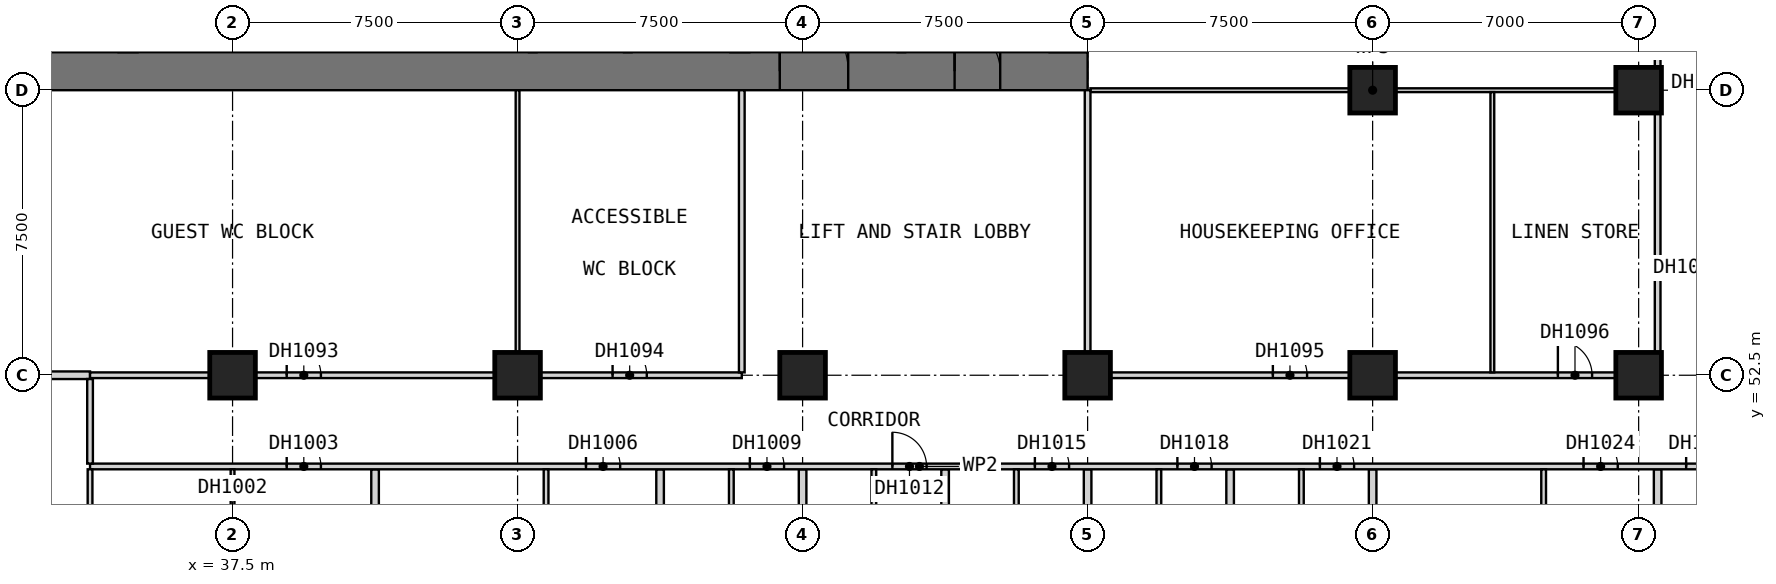
"""IFC4 building model, lengths in metres.
Left out: names, types, materials, properties, quantities, classifications, styles, units other than length and angle.
Written with IfcOpenShell. Run it as: python <this file> out.ifc"""

import sys

from ifc_helpers import new_model, si_unit, direction, frame, frame_2d, origin, origin_2d, place, context, subcontext, project, spatial, rectangle, extrude, element, fill, save


model = new_model("IFC4")
c1 = context("Model", 3, precision=1e-05, world=origin(), true_north=direction((0.0, 1.0)))
c2 = subcontext(c1, "Body", "Model", "MODEL_VIEW")
j1 = project(units=[si_unit("LENGTHUNIT", "METRE"), si_unit("PLANEANGLEUNIT", "RADIAN")], contexts=[c1])
p1 = place(None, origin())
s1 = spatial("IfcSite", under=j1, at=p1, CompositionType="ELEMENT")
p2 = place(p1, origin())
s2 = spatial("IfcBuilding", under=s1, at=p2, CompositionType="ELEMENT")
p3 = place(p2, frame((0.0, 0.0, 34.0)))
s3 = spatial("IfcBuildingStorey", under=s2, at=p3, CompositionType="ELEMENT", Elevation=34.0)
for number, where, z_axis, x_axis in (
    (1, (37.5, 52.5, 0.0), (0.0, 0.0, 1.0), (1.0, 0.0, 0.0)),
    (2, (45.0, 52.5, 0.0), (0.0, 0.0, 1.0), (1.0, 0.0, 0.0)),
    (3, (52.5, 52.5, 0.0), (0.0, 0.0, 1.0), (1.0, 0.0, 0.0)),
    (4, (60.0, 52.5, 0.0), (0.0, 0.0, 1.0), (1.0, 0.0, 0.0)),
    (5, (67.5, 52.5, 0.0), (0.0, 0.0, 1.0), (1.0, 0.0, 0.0)),
    (6, (67.5, 60.0, 0.0), (0.0, 0.0, 1.0), (1.0, 0.0, 0.0)),
    (7, (74.5, 52.5, 0.0), (0.0, 0.0, 1.0), (1.0, 0.0, 0.0)),
    (8, (74.5, 60.0, 0.0), (0.0, 0.0, 1.0), (1.0, 0.0, 0.0)),
):
    element("IfcColumn", number, at=place(p3, frame(where, z_axis=z_axis, x_axis=x_axis)), inside=s3, PredefinedType="COLUMN", context=c2, shape_type="SweptSolid", body=[
        extrude(rectangle(XDim=1.2, YDim=1.2, at=origin_2d()), origin(), (0.0, 0.0, 1.0), 3.6),
    ])
p4 = place(p3, frame((30.0, 60.5, 0.0), z_axis=(0.0, 0.0, 1.0), x_axis=(1.0, 0.0, 0.0)))
e9 = element("IfcWall", 9, at=p4, inside=s3, PredefinedType="SHEAR", context=c2, shape_type="SweptSolid", body=[
    extrude(rectangle(XDim=30.0, YDim=1.0, at=frame_2d((15.0, 0.0))), origin(), (0.0, 0.0, 1.0), 3.6),
])
p5 = place(p4, frame((21.9, 0.0, 0.0)))
e10 = element("IfcOpeningElement", 10, at=p5, cuts=e9, PredefinedType="OPENING", context=c2, shape_type="SweptSolid", body=[
    extrude(rectangle(XDim=1.8, YDim=2.1, at=frame_2d((0.9, 1.05))), frame((0.0, 0.51, 0.0), z_axis=(0.0, -1.0, 0.0), x_axis=(1.0, 0.0, 0.0)), (0.0, 0.0, 1.0), 1.02),
])
p6 = place(p4, frame((26.5, 0.0, 0.0)))
e11 = element("IfcOpeningElement", 11, at=p6, cuts=e9, PredefinedType="OPENING", context=c2, shape_type="SweptSolid", body=[
    extrude(rectangle(XDim=1.2, YDim=2.1, at=frame_2d((0.6, 1.05))), frame((0.0, 0.51, 0.0), z_axis=(0.0, -1.0, 0.0), x_axis=(1.0, 0.0, 0.0)), (0.0, 0.0, 1.0), 1.02),
])
p7 = place(p3, frame((30.0, 52.5, 0.0), z_axis=(0.0, 0.0, 1.0), x_axis=(1.0, 0.0, 0.0)))
e12 = element("IfcWall", 12, at=p7, inside=s3, PredefinedType="PARTITIONING", context=c2, shape_type="SweptSolid", body=[
    extrude(rectangle(XDim=3.75, YDim=0.2, at=frame_2d((1.875, 0.0))), origin(), (0.0, 0.0, 1.0), 3.35),
])
for number, where, z_axis, x_axis in (
    (13, (41.25, 38.31, 0.0), (0.0, 0.0, 1.0), (0.0, 1.0, 0.0)),
    (14, (48.75, 38.31, 0.0), (0.0, 0.0, 1.0), (0.0, 1.0, 0.0)),
):
    element("IfcWall", number, at=place(p3, frame(where, z_axis=z_axis, x_axis=x_axis)), inside=s3, PredefinedType="PARTITIONING", context=c2, shape_type="SweptSolid", body=[
        extrude(rectangle(XDim=11.715, YDim=0.2, at=frame_2d((5.857, 0.0))), origin(), (0.0, 0.0, 1.0), 3.35),
    ])
p8 = place(p3, frame((52.5, 37.5, 0.0), z_axis=(0.0, 0.0, 1.0), x_axis=(0.0, 1.0, 0.0)))
e15 = element("IfcWall", 15, at=p8, inside=s3, PredefinedType="PARTITIONING", context=c2, shape_type="SweptSolid", body=[
    extrude(rectangle(XDim=12.525, YDim=0.2, at=frame_2d((6.262, 0.0))), origin(), (0.0, 0.0, 1.0), 3.35),
])
p9 = place(p3, frame((56.25, 38.31, 0.0), z_axis=(0.0, 0.0, 1.0), x_axis=(0.0, 1.0, 0.0)))
e16 = element("IfcWall", 16, at=p9, inside=s3, PredefinedType="PARTITIONING", context=c2, shape_type="SweptSolid", body=[
    extrude(rectangle(XDim=11.715, YDim=0.2, at=frame_2d((5.857, 0.0))), origin(), (0.0, 0.0, 1.0), 3.35),
])
p10 = place(p3, frame((60.0, 37.5, 0.0), z_axis=(0.0, 0.0, 1.0), x_axis=(0.0, 1.0, 0.0)))
e17 = element("IfcWall", 17, at=p10, inside=s3, PredefinedType="PARTITIONING", context=c2, shape_type="SweptSolid", body=[
    extrude(rectangle(XDim=12.525, YDim=0.2, at=frame_2d((6.262, 0.0))), origin(), (0.0, 0.0, 1.0), 3.35),
])
p11 = place(p3, frame((63.75, 38.31, 0.0), z_axis=(0.0, 0.0, 1.0), x_axis=(0.0, 1.0, 0.0)))
e18 = element("IfcWall", 18, at=p11, inside=s3, PredefinedType="PARTITIONING", context=c2, shape_type="SweptSolid", body=[
    extrude(rectangle(XDim=11.715, YDim=0.2, at=frame_2d((5.857, 0.0))), origin(), (0.0, 0.0, 1.0), 3.35),
])
p12 = place(p3, frame((67.5, 37.5, 0.0), z_axis=(0.0, 0.0, 1.0), x_axis=(0.0, 1.0, 0.0)))
e19 = element("IfcWall", 19, at=p12, inside=s3, PredefinedType="PARTITIONING", context=c2, shape_type="SweptSolid", body=[
    extrude(rectangle(XDim=12.525, YDim=0.2, at=frame_2d((6.262, 0.0))), origin(), (0.0, 0.0, 1.0), 3.35),
])
p13 = place(p3, frame((75.0, 38.31, 0.0), z_axis=(0.0, 0.0, 1.0), x_axis=(0.0, 1.0, 0.0)))
e20 = element("IfcWall", 20, at=p13, inside=s3, PredefinedType="PARTITIONING", context=c2, shape_type="SweptSolid", body=[
    extrude(rectangle(XDim=11.715, YDim=0.2, at=frame_2d((5.857, 0.0))), origin(), (0.0, 0.0, 1.0), 3.35),
])
p14 = place(p3, frame((33.75, 50.1, 0.0), z_axis=(0.0, 0.0, 1.0), x_axis=(1.0, 0.0, 0.0)))
e21 = element("IfcWall", 21, at=p14, inside=s3, PredefinedType="PARTITIONING", context=c2, shape_type="SweptSolid", body=[
    extrude(rectangle(XDim=43.65, YDim=0.15, at=frame_2d((21.825, 0.0))), origin(), (0.0, 0.0, 1.0), 3.35),
])
p15 = place(p14, frame((5.175, 0.0, 0.0)))
e22 = element("IfcOpeningElement", 22, at=p15, cuts=e21, PredefinedType="OPENING", context=c2, shape_type="SweptSolid", body=[
    extrude(rectangle(XDim=0.9, YDim=2.1, at=frame_2d((0.45, 1.05))), frame((0.0, 0.085, 0.0), z_axis=(0.0, -1.0, 0.0), x_axis=(1.0, 0.0, 0.0)), (0.0, 0.0, 1.0), 0.17),
])
p16 = place(p14, frame((13.05, 0.0, 0.0)))
e23 = element("IfcOpeningElement", 23, at=p16, cuts=e21, PredefinedType="OPENING", context=c2, shape_type="SweptSolid", body=[
    extrude(rectangle(XDim=0.9, YDim=2.1, at=frame_2d((0.45, 1.05))), frame((0.0, 0.085, 0.0), z_axis=(0.0, -1.0, 0.0), x_axis=(1.0, 0.0, 0.0)), (0.0, 0.0, 1.0), 0.17),
])
p17 = place(p14, frame((17.363, 0.0, 0.0)))
e24 = element("IfcOpeningElement", 24, at=p17, cuts=e21, PredefinedType="OPENING", context=c2, shape_type="SweptSolid", body=[
    extrude(rectangle(XDim=0.9, YDim=2.1, at=frame_2d((0.45, 1.05))), frame((0.0, 0.085, 0.0), z_axis=(0.0, -1.0, 0.0), x_axis=(1.0, 0.0, 0.0)), (0.0, 0.0, 1.0), 0.17),
])
p18 = place(p14, frame((21.113, 0.0, 0.0)))
e25 = element("IfcOpeningElement", 25, at=p18, cuts=e21, PredefinedType="OPENING", context=c2, shape_type="SweptSolid", body=[
    extrude(rectangle(XDim=0.9, YDim=2.1, at=frame_2d((0.45, 1.05))), frame((0.0, 0.085, 0.0), z_axis=(0.0, -1.0, 0.0), x_axis=(1.0, 0.0, 0.0)), (0.0, 0.0, 1.0), 0.17),
])
p19 = place(p14, frame((24.863, 0.0, 0.0)))
e26 = element("IfcOpeningElement", 26, at=p19, cuts=e21, PredefinedType="OPENING", context=c2, shape_type="SweptSolid", body=[
    extrude(rectangle(XDim=0.9, YDim=2.1, at=frame_2d((0.45, 1.05))), frame((0.0, 0.085, 0.0), z_axis=(0.0, -1.0, 0.0), x_axis=(1.0, 0.0, 0.0)), (0.0, 0.0, 1.0), 0.17),
])
p20 = place(p14, frame((28.613, 0.0, 0.0)))
e27 = element("IfcOpeningElement", 27, at=p20, cuts=e21, PredefinedType="OPENING", context=c2, shape_type="SweptSolid", body=[
    extrude(rectangle(XDim=0.9, YDim=2.1, at=frame_2d((0.45, 1.05))), frame((0.0, 0.085, 0.0), z_axis=(0.0, -1.0, 0.0), x_axis=(1.0, 0.0, 0.0)), (0.0, 0.0, 1.0), 0.17),
])
p21 = place(p14, frame((32.363, 0.0, 0.0)))
e28 = element("IfcOpeningElement", 28, at=p21, cuts=e21, PredefinedType="OPENING", context=c2, shape_type="SweptSolid", body=[
    extrude(rectangle(XDim=0.9, YDim=2.1, at=frame_2d((0.45, 1.05))), frame((0.0, 0.085, 0.0), z_axis=(0.0, -1.0, 0.0), x_axis=(1.0, 0.0, 0.0)), (0.0, 0.0, 1.0), 0.17),
])
p22 = place(p14, frame((39.3, 0.0, 0.0)))
e29 = element("IfcOpeningElement", 29, at=p22, cuts=e21, PredefinedType="OPENING", context=c2, shape_type="SweptSolid", body=[
    extrude(rectangle(XDim=0.9, YDim=2.1, at=frame_2d((0.45, 1.05))), frame((0.0, 0.085, 0.0), z_axis=(0.0, -1.0, 0.0), x_axis=(1.0, 0.0, 0.0)), (0.0, 0.0, 1.0), 0.17),
])
p23 = place(p14, frame((42.0, 0.0, 0.0)))
e30 = element("IfcOpeningElement", 30, at=p23, cuts=e21, PredefinedType="OPENING", context=c2, shape_type="SweptSolid", body=[
    extrude(rectangle(XDim=0.9, YDim=2.1, at=frame_2d((0.45, 1.05))), frame((0.0, 0.085, 0.0), z_axis=(0.0, -1.0, 0.0), x_axis=(1.0, 0.0, 0.0)), (0.0, 0.0, 1.0), 0.17),
])
p24 = place(p3, frame((33.75, 52.5, 0.0), z_axis=(0.0, 0.0, 1.0), x_axis=(1.0, 0.0, 0.0)))
e31 = element("IfcWall", 31, at=p24, inside=s3, PredefinedType="PARTITIONING", context=c2, shape_type="SweptSolid", body=[
    extrude(rectangle(XDim=17.15, YDim=0.15, at=frame_2d((8.575, 0.0))), origin(), (0.0, 0.0, 1.0), 3.35),
])
p25 = place(p24, frame((5.175, 0.0, 0.0)))
e32 = element("IfcOpeningElement", 32, at=p25, cuts=e31, PredefinedType="OPENING", context=c2, shape_type="SweptSolid", body=[
    extrude(rectangle(XDim=0.9, YDim=2.1, at=frame_2d((0.45, 1.05))), frame((0.0, 0.085, 0.0), z_axis=(0.0, -1.0, 0.0), x_axis=(1.0, 0.0, 0.0)), (0.0, 0.0, 1.0), 0.17),
])
p26 = place(p24, frame((13.75, 0.0, 0.0)))
e33 = element("IfcOpeningElement", 33, at=p26, cuts=e31, PredefinedType="OPENING", context=c2, shape_type="SweptSolid", body=[
    extrude(rectangle(XDim=0.9, YDim=2.1, at=frame_2d((0.45, 1.05))), frame((0.0, 0.085, 0.0), z_axis=(0.0, -1.0, 0.0), x_axis=(1.0, 0.0, 0.0)), (0.0, 0.0, 1.0), 0.17),
])
p27 = place(p3, frame((60.0, 52.5, 0.0), z_axis=(0.0, 0.0, 1.0), x_axis=(1.0, 0.0, 0.0)))
e34 = element("IfcWall", 34, at=p27, inside=s3, PredefinedType="PARTITIONING", context=c2, shape_type="SweptSolid", body=[
    extrude(rectangle(XDim=15.0, YDim=0.15, at=frame_2d((7.5, 0.0))), origin(), (0.0, 0.0, 1.0), 3.35),
])
p28 = place(p27, frame((4.875, 0.0, 0.0)))
e35 = element("IfcOpeningElement", 35, at=p28, cuts=e34, PredefinedType="OPENING", context=c2, shape_type="SweptSolid", body=[
    extrude(rectangle(XDim=0.9, YDim=2.1, at=frame_2d((0.45, 1.05))), frame((0.0, 0.085, 0.0), z_axis=(0.0, -1.0, 0.0), x_axis=(1.0, 0.0, 0.0)), (0.0, 0.0, 1.0), 0.17),
])
p29 = place(p27, frame((12.375, 0.0, 0.0)))
e36 = element("IfcOpeningElement", 36, at=p29, cuts=e34, PredefinedType="OPENING", context=c2, shape_type="SweptSolid", body=[
    extrude(rectangle(XDim=0.9, YDim=2.1, at=frame_2d((0.45, 1.05))), frame((0.0, 0.085, 0.0), z_axis=(0.0, -1.0, 0.0), x_axis=(1.0, 0.0, 0.0)), (0.0, 0.0, 1.0), 0.17),
])
p30 = place(p3, frame((33.75, 50.175, 0.0), z_axis=(0.0, 0.0, 1.0), x_axis=(0.0, 1.0, 0.0)))
e37 = element("IfcWall", 37, at=p30, inside=s3, PredefinedType="PARTITIONING", context=c2, shape_type="SweptSolid", body=[
    extrude(rectangle(XDim=2.225, YDim=0.15, at=frame_2d((1.112, 0.0))), origin(), (0.0, 0.0, 1.0), 3.35),
])
p31 = place(p3, frame((75.0, 52.575, 0.0), z_axis=(0.0, 0.0, 1.0), x_axis=(0.0, 1.0, 0.0)))
e38 = element("IfcWall", 38, at=p31, inside=s3, PredefinedType="PARTITIONING", context=c2, shape_type="SweptSolid", body=[
    extrude(rectangle(XDim=11.85, YDim=0.15, at=frame_2d((5.925, 0.0))), origin(), (0.0, 0.0, 1.0), 3.35),
])
p32 = place(p31, frame((9.225, 0.0, 0.0)))
e39 = element("IfcOpeningElement", 39, at=p32, cuts=e38, PredefinedType="OPENING", context=c2, shape_type="SweptSolid", body=[
    extrude(rectangle(XDim=0.9, YDim=2.1, at=frame_2d((0.45, 1.05))), frame((0.0, 0.085, 0.0), z_axis=(0.0, -1.0, 0.0), x_axis=(1.0, 0.0, 0.0)), (0.0, 0.0, 1.0), 0.17),
])
p33 = place(p3, frame((60.075, 60.0, 0.0), z_axis=(0.0, 0.0, 1.0), x_axis=(1.0, 0.0, 0.0)))
e40 = element("IfcWall", 40, at=p33, inside=s3, PredefinedType="PARTITIONING", context=c2, shape_type="SweptSolid", body=[
    extrude(rectangle(XDim=14.85, YDim=0.1, at=frame_2d((7.425, 0.0))), origin(), (0.0, 0.0, 1.0), 3.35),
])
p34 = place(p3, frame((37.5, 45.8, 0.0), z_axis=(0.0, 0.0, 1.0), x_axis=(0.0, 1.0, 0.0)))
e41 = element("IfcWall", 41, at=p34, inside=s3, PredefinedType="PARTITIONING", context=c2, shape_type="SweptSolid", body=[
    extrude(rectangle(XDim=4.225, YDim=0.1, at=frame_2d((2.112, 0.0))), origin(), (0.0, 0.0, 1.0), 3.35),
])
p35 = place(p34, frame((1.675, 0.0, 0.0)))
e42 = element("IfcOpeningElement", 42, at=p35, cuts=e41, PredefinedType="OPENING", context=c2, shape_type="SweptSolid", body=[
    extrude(rectangle(XDim=0.9, YDim=2.1, at=frame_2d((0.45, 1.05))), frame((0.0, 0.06, 0.0), z_axis=(0.0, -1.0, 0.0), x_axis=(1.0, 0.0, 0.0)), (0.0, 0.0, 1.0), 0.12),
])
p36 = place(p3, frame((45.0, 52.575, 0.0), z_axis=(0.0, 0.0, 1.0), x_axis=(0.0, 1.0, 0.0)))
e43 = element("IfcWall", 43, at=p36, inside=s3, PredefinedType="PARTITIONING", context=c2, shape_type="SweptSolid", body=[
    extrude(rectangle(XDim=7.425, YDim=0.1, at=frame_2d((3.712, 0.0))), origin(), (0.0, 0.0, 1.0), 3.35),
])
p37 = place(p3, frame((70.65, 52.575, 0.0), z_axis=(0.0, 0.0, 1.0), x_axis=(0.0, 1.0, 0.0)))
e44 = element("IfcWall", 44, at=p37, inside=s3, PredefinedType="PARTITIONING", context=c2, shape_type="SweptSolid", body=[
    extrude(rectangle(XDim=7.375, YDim=0.1, at=frame_2d((3.688, 0.0))), origin(), (0.0, 0.0, 1.0), 3.35),
])
for number, where, z_axis, x_axis in (
    (45, (33.75, 45.812, 0.0), (0.0, 0.0, 1.0), (0.0, 1.0, 0.0)),
    (46, (45.75, 45.812, 0.0), (0.0, 0.0, 1.0), (0.0, 1.0, 0.0)),
    (47, (50.625, 45.812, 0.0), (0.0, 0.0, 1.0), (0.0, 1.0, 0.0)),
    (48, (54.375, 45.812, 0.0), (0.0, 0.0, 1.0), (0.0, 1.0, 0.0)),
    (49, (58.125, 45.812, 0.0), (0.0, 0.0, 1.0), (0.0, 1.0, 0.0)),
    (50, (61.875, 45.812, 0.0), (0.0, 0.0, 1.0), (0.0, 1.0, 0.0)),
    (51, (65.625, 45.812, 0.0), (0.0, 0.0, 1.0), (0.0, 1.0, 0.0)),
    (52, (72.0, 45.812, 0.0), (0.0, 0.0, 1.0), (0.0, 1.0, 0.0)),
):
    element("IfcWall", number, at=place(p3, frame(where, z_axis=z_axis, x_axis=x_axis)), inside=s3, PredefinedType="PARTITIONING", context=c2, shape_type="SweptSolid", body=[
        extrude(rectangle(XDim=4.212, YDim=0.125, at=frame_2d((2.106, 0.0))), origin(), (0.0, 0.0, 1.0), 3.35),
    ])
for number, where, z_axis, x_axis in (
    (53, (50.9, 52.575, 0.0), (0.0, 0.0, 1.0), (0.0, 1.0, 0.0)),
    (54, (60.0, 52.575, 0.0), (0.0, 0.0, 1.0), (0.0, 1.0, 0.0)),
):
    element("IfcWall", number, at=place(p3, frame(where, z_axis=z_axis, x_axis=x_axis)), inside=s3, PredefinedType="PARTITIONING", context=c2, shape_type="SweptSolid", body=[
        extrude(rectangle(XDim=7.425, YDim=0.15, at=frame_2d((3.712, 0.0))), origin(), (0.0, 0.0, 1.0), 3.35),
    ])
p38 = place(p5, origin())
e55 = element("IfcDoor", 55, at=p38, inside=s3, OperationType="DOUBLE_DOOR_SINGLE_SWING", PredefinedType="DOOR", context=c2, shape_type="SweptSolid", body=[
    extrude(rectangle(XDim=1.8, YDim=2.1, at=frame_2d((0.9, 1.05))), frame((0.0, 0.025, 0.0), z_axis=(0.0, -1.0, 0.0), x_axis=(1.0, 0.0, 0.0)), (0.0, 0.0, 1.0), 0.05),
])
fill(e10, e55)
p39 = place(p6, origin())
e56 = element("IfcDoor", 56, at=p39, inside=s3, OperationType="SINGLE_SWING_LEFT", PredefinedType="DOOR", context=c2, shape_type="SweptSolid", body=[
    extrude(rectangle(XDim=1.2, YDim=2.1, at=frame_2d((0.6, 1.05))), frame((0.0, 0.025, 0.0), z_axis=(0.0, -1.0, 0.0), x_axis=(1.0, 0.0, 0.0)), (0.0, 0.0, 1.0), 0.05),
])
fill(e11, e56)
p40 = place(p15, origin())
e57 = element("IfcDoor", 57, at=p40, inside=s3, OperationType="SINGLE_SWING_RIGHT", PredefinedType="DOOR", context=c2, shape_type="SweptSolid", body=[
    extrude(rectangle(XDim=0.9, YDim=2.1, at=frame_2d((0.45, 1.05))), frame((0.0, 0.025, 0.0), z_axis=(0.0, -1.0, 0.0), x_axis=(1.0, 0.0, 0.0)), (0.0, 0.0, 1.0), 0.05),
])
fill(e22, e57)
p41 = place(p16, origin())
e58 = element("IfcDoor", 58, at=p41, inside=s3, OperationType="SINGLE_SWING_RIGHT", PredefinedType="DOOR", context=c2, shape_type="SweptSolid", body=[
    extrude(rectangle(XDim=0.9, YDim=2.1, at=frame_2d((0.45, 1.05))), frame((0.0, 0.025, 0.0), z_axis=(0.0, -1.0, 0.0), x_axis=(1.0, 0.0, 0.0)), (0.0, 0.0, 1.0), 0.05),
])
fill(e23, e58)
p42 = place(p17, origin())
e59 = element("IfcDoor", 59, at=p42, inside=s3, OperationType="SINGLE_SWING_RIGHT", PredefinedType="DOOR", context=c2, shape_type="SweptSolid", body=[
    extrude(rectangle(XDim=0.9, YDim=2.1, at=frame_2d((0.45, 1.05))), frame((0.0, 0.025, 0.0), z_axis=(0.0, -1.0, 0.0), x_axis=(1.0, 0.0, 0.0)), (0.0, 0.0, 1.0), 0.05),
])
fill(e24, e59)
p43 = place(p18, origin())
e60 = element("IfcDoor", 60, at=p43, inside=s3, OperationType="SINGLE_SWING_RIGHT", PredefinedType="DOOR", context=c2, shape_type="SweptSolid", body=[
    extrude(rectangle(XDim=0.9, YDim=2.1, at=frame_2d((0.45, 1.05))), frame((0.0, 0.025, 0.0), z_axis=(0.0, -1.0, 0.0), x_axis=(1.0, 0.0, 0.0)), (0.0, 0.0, 1.0), 0.05),
])
fill(e25, e60)
p44 = place(p19, origin())
e61 = element("IfcDoor", 61, at=p44, inside=s3, OperationType="SINGLE_SWING_RIGHT", PredefinedType="DOOR", context=c2, shape_type="SweptSolid", body=[
    extrude(rectangle(XDim=0.9, YDim=2.1, at=frame_2d((0.45, 1.05))), frame((0.0, 0.025, 0.0), z_axis=(0.0, -1.0, 0.0), x_axis=(1.0, 0.0, 0.0)), (0.0, 0.0, 1.0), 0.05),
])
fill(e26, e61)
p45 = place(p20, origin())
e62 = element("IfcDoor", 62, at=p45, inside=s3, OperationType="SINGLE_SWING_RIGHT", PredefinedType="DOOR", context=c2, shape_type="SweptSolid", body=[
    extrude(rectangle(XDim=0.9, YDim=2.1, at=frame_2d((0.45, 1.05))), frame((0.0, 0.025, 0.0), z_axis=(0.0, -1.0, 0.0), x_axis=(1.0, 0.0, 0.0)), (0.0, 0.0, 1.0), 0.05),
])
fill(e27, e62)
p46 = place(p21, origin())
e63 = element("IfcDoor", 63, at=p46, inside=s3, OperationType="SINGLE_SWING_RIGHT", PredefinedType="DOOR", context=c2, shape_type="SweptSolid", body=[
    extrude(rectangle(XDim=0.9, YDim=2.1, at=frame_2d((0.45, 1.05))), frame((0.0, 0.025, 0.0), z_axis=(0.0, -1.0, 0.0), x_axis=(1.0, 0.0, 0.0)), (0.0, 0.0, 1.0), 0.05),
])
fill(e28, e63)
p47 = place(p22, origin())
e64 = element("IfcDoor", 64, at=p47, inside=s3, OperationType="SINGLE_SWING_RIGHT", PredefinedType="DOOR", context=c2, shape_type="SweptSolid", body=[
    extrude(rectangle(XDim=0.9, YDim=2.1, at=frame_2d((0.45, 1.05))), frame((0.0, 0.025, 0.0), z_axis=(0.0, -1.0, 0.0), x_axis=(1.0, 0.0, 0.0)), (0.0, 0.0, 1.0), 0.05),
])
fill(e29, e64)
p48 = place(p23, origin())
e65 = element("IfcDoor", 65, at=p48, inside=s3, OperationType="SINGLE_SWING_LEFT", PredefinedType="DOOR", context=c2, shape_type="SweptSolid", body=[
    extrude(rectangle(XDim=0.9, YDim=2.1, at=frame_2d((0.45, 1.05))), frame((0.0, 0.025, 0.0), z_axis=(0.0, -1.0, 0.0), x_axis=(1.0, 0.0, 0.0)), (0.0, 0.0, 1.0), 0.05),
])
fill(e30, e65)
p49 = place(p25, origin())
e66 = element("IfcDoor", 66, at=p49, inside=s3, OperationType="SINGLE_SWING_LEFT", PredefinedType="DOOR", context=c2, shape_type="SweptSolid", body=[
    extrude(rectangle(XDim=0.9, YDim=2.1, at=frame_2d((0.45, 1.05))), frame((0.0, 0.025, 0.0), z_axis=(0.0, -1.0, 0.0), x_axis=(1.0, 0.0, 0.0)), (0.0, 0.0, 1.0), 0.05),
])
fill(e32, e66)
p50 = place(p26, origin())
e67 = element("IfcDoor", 67, at=p50, inside=s3, OperationType="SINGLE_SWING_LEFT", PredefinedType="DOOR", context=c2, shape_type="SweptSolid", body=[
    extrude(rectangle(XDim=0.9, YDim=2.1, at=frame_2d((0.45, 1.05))), frame((0.0, 0.025, 0.0), z_axis=(0.0, -1.0, 0.0), x_axis=(1.0, 0.0, 0.0)), (0.0, 0.0, 1.0), 0.05),
])
fill(e33, e67)
p51 = place(p28, origin())
e68 = element("IfcDoor", 68, at=p51, inside=s3, OperationType="SINGLE_SWING_RIGHT", PredefinedType="DOOR", context=c2, shape_type="SweptSolid", body=[
    extrude(rectangle(XDim=0.9, YDim=2.1, at=frame_2d((0.45, 1.05))), frame((0.0, 0.025, 0.0), z_axis=(0.0, -1.0, 0.0), x_axis=(1.0, 0.0, 0.0)), (0.0, 0.0, 1.0), 0.05),
])
fill(e35, e68)
p52 = place(p29, origin())
e69 = element("IfcDoor", 69, at=p52, inside=s3, OperationType="SINGLE_SWING_RIGHT", PredefinedType="DOOR", context=c2, shape_type="SweptSolid", body=[
    extrude(rectangle(XDim=0.9, YDim=2.1, at=frame_2d((0.45, 1.05))), frame((0.0, 0.025, 0.0), z_axis=(0.0, -1.0, 0.0), x_axis=(1.0, 0.0, 0.0)), (0.0, 0.0, 1.0), 0.05),
])
fill(e36, e69)
save(model, sys.argv[1])
